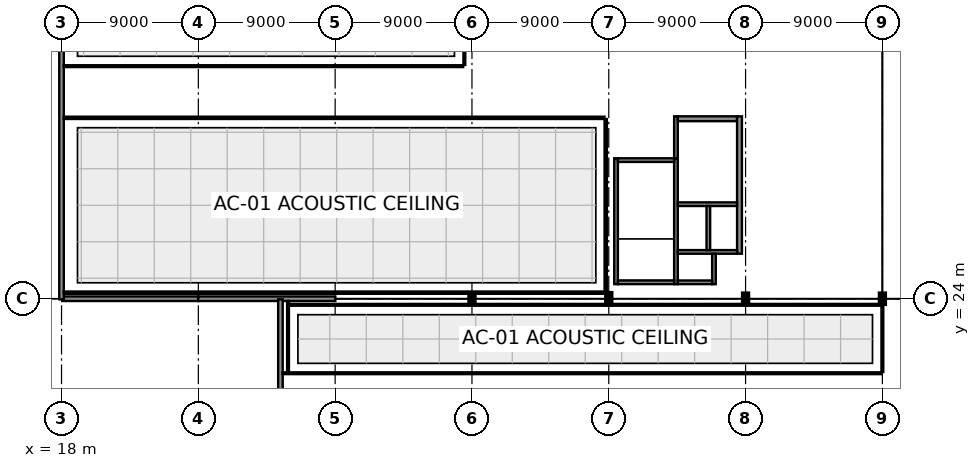
"""IFC4 building model, lengths in metres.
Left out: names, types, materials, properties, quantities, classifications, styles, units other than length and angle.
Written with IfcOpenShell. Run it as: python <this file> out.ifc"""

import sys

from ifc_helpers import new_model, si_unit, direction, frame, frame_2d, origin, origin_2d, place, context, subcontext, project, spatial, rectangle, i_section, extrude, element, fill, save


model = new_model("IFC4")
c1 = context("Model", 3, precision=1e-05, world=origin(), true_north=direction((0.0, 1.0)))
c2 = subcontext(c1, "Body", "Model", "MODEL_VIEW")
j1 = project(units=[si_unit("LENGTHUNIT", "METRE"), si_unit("PLANEANGLEUNIT", "RADIAN")], contexts=[c1])
p1 = place(None, origin())
s1 = spatial("IfcSite", under=j1, at=p1, CompositionType="ELEMENT")
p2 = place(p1, origin())
s2 = spatial("IfcBuilding", under=s1, at=p2, CompositionType="ELEMENT")
p3 = place(p2, frame((0.0, 0.0, 5.4)))
s3 = spatial("IfcBuildingStorey", under=s2, at=p3, CompositionType="ELEMENT", Elevation=5.4)
for number, where, z_axis, x_axis in (
    (1, (45.0, 24.0, 0.0), (0.0, 0.0, 1.0), (1.0, 0.0, 0.0)),
    (2, (54.0, 24.0, 0.0), (0.0, 0.0, 1.0), (0.0, 1.0, 0.0)),
):
    element("IfcColumn", number, at=place(p3, frame(where, z_axis=z_axis, x_axis=x_axis)), inside=s3, PredefinedType="COLUMN", context=c2, shape_type="SweptSolid", body=[
        extrude(i_section(OverallWidth=0.304, OverallDepth=0.716, WebThickness=0.021, FlangeThickness=0.04, at=origin_2d()), origin(), (0.0, 0.0, 1.0), 4.5),
    ])
for number, where, z_axis, x_axis in (
    (3, (63.0, 24.0, 0.0), (0.0, 0.0, 1.0), (1.0, 0.0, 0.0)),
    (4, (72.0, 24.0, 0.0), (0.0, 0.0, 1.0), (1.0, 0.0, 0.0)),
):
    element("IfcColumn", number, at=place(p3, frame(where, z_axis=z_axis, x_axis=x_axis)), inside=s3, PredefinedType="COLUMN", context=c2, shape_type="SweptSolid", body=[
        extrude(i_section(OverallWidth=0.3, OverallDepth=0.65, WebThickness=0.016, FlangeThickness=0.031, at=origin_2d()), origin(), (0.0, 0.0, 1.0), 4.5),
    ])
p4 = place(p3, frame((18.04, 24.0, 0.0), z_axis=(0.0, 0.0, 1.0), x_axis=(1.0, 0.0, 0.0)))
e5 = element("IfcWall", 5, at=p4, inside=s3, PredefinedType="SOLIDWALL", context=c2, shape_type="SweptSolid", body=[
    extrude(rectangle(XDim=8.97, YDim=0.3, at=frame_2d((4.485, 0.0))), origin(), (0.0, 0.0, 1.0), 4.18),
])
p5 = place(p4, frame((1.512, 0.0, 0.85)))
e6 = element("IfcOpeningElement", 6, at=p5, cuts=e5, PredefinedType="OPENING", context=c2, shape_type="SweptSolid", body=[
    extrude(rectangle(XDim=2.0, YDim=2.0, at=frame_2d((1.0, 1.0))), frame((0.0, 0.165, 0.0), z_axis=(0.0, -1.0, 0.0), x_axis=(1.0, 0.0, 0.0)), (0.0, 0.0, 1.0), 0.33),
])
p6 = place(p4, frame((5.458, 0.0, 0.85)))
e7 = element("IfcOpeningElement", 7, at=p6, cuts=e5, PredefinedType="OPENING", context=c2, shape_type="SweptSolid", body=[
    extrude(rectangle(XDim=2.0, YDim=2.0, at=frame_2d((1.0, 1.0))), frame((0.0, 0.165, 0.0), z_axis=(0.0, -1.0, 0.0), x_axis=(1.0, 0.0, 0.0)), (0.0, 0.0, 1.0), 0.33),
])
p7 = place(p3, frame((26.99, 24.0, 0.0), z_axis=(0.0, 0.0, 1.0), x_axis=(1.0, 0.0, 0.0)))
e8 = element("IfcWall", 8, at=p7, inside=s3, PredefinedType="SOLIDWALL", context=c2, shape_type="SweptSolid", body=[
    extrude(rectangle(XDim=9.02, YDim=0.3, at=frame_2d((4.51, 0.0))), origin(), (0.0, 0.0, 1.0), 3.147),
])
p8 = place(p3, frame((18.0, 41.727, 0.0), z_axis=(0.0, 0.0, 1.0), x_axis=(0.0, -1.0, 0.0)))
e9 = element("IfcWall", 9, at=p8, inside=s3, PredefinedType="SOLIDWALL", context=c2, shape_type="SweptSolid", body=[
    extrude(rectangle(XDim=17.767, YDim=0.3, at=frame_2d((8.884, 0.0))), origin(), (0.0, 0.0, 1.0), 4.18),
])
p9 = place(p8, frame((9.677, 0.0, 0.0)))
e10 = element("IfcOpeningElement", 10, at=p9, cuts=e9, PredefinedType="OPENING", context=c2, shape_type="SweptSolid", body=[
    extrude(rectangle(XDim=1.1, YDim=2.2, at=frame_2d((0.55, 1.1))), frame((0.0, 0.165, 0.0), z_axis=(0.0, -1.0, 0.0), x_axis=(1.0, 0.0, 0.0)), (0.0, 0.0, 1.0), 0.33),
])
p10 = place(p3, frame((32.4, 23.96, 0.0), z_axis=(0.0, 0.0, 1.0), x_axis=(0.0, -1.0, 0.0)))
e11 = element("IfcWall", 11, at=p10, inside=s3, PredefinedType="SOLIDWALL", context=c2, shape_type="SweptSolid", body=[
    extrude(rectangle(XDim=11.97, YDim=0.3, at=frame_2d((5.985, 0.0))), origin(), (0.0, 0.0, 1.0), 3.455),
])
p11 = place(p10, frame((2.941, 0.0, 0.9)))
e12 = element("IfcOpeningElement", 12, at=p11, cuts=e11, PredefinedType="OPENING", context=c2, shape_type="SweptSolid", body=[
    extrude(rectangle(XDim=1.3, YDim=1.3, at=frame_2d((0.65, 0.65))), frame((0.0, 0.165, 0.0), z_axis=(0.0, -1.0, 0.0), x_axis=(1.0, 0.0, 0.0)), (0.0, 0.0, 1.0), 0.33),
])
p12 = place(p10, frame((8.5, 0.0, 0.9)))
e13 = element("IfcOpeningElement", 13, at=p12, cuts=e11, PredefinedType="OPENING", context=c2, shape_type="SweptSolid", body=[
    extrude(rectangle(XDim=1.3, YDim=1.3, at=frame_2d((0.65, 0.65))), frame((0.0, 0.165, 0.0), z_axis=(0.0, -1.0, 0.0), x_axis=(1.0, 0.0, 0.0)), (0.0, 0.0, 1.0), 0.33),
])
p13 = place(p3, frame((54.48, 24.96, 0.0), z_axis=(0.0, 0.0, 1.0), x_axis=(0.0, 1.0, 0.0)))
e14 = element("IfcWall", 14, at=p13, inside=s3, PredefinedType="SHEAR", context=c2, shape_type="SweptSolid", body=[
    extrude(rectangle(XDim=8.28, YDim=0.24, at=frame_2d((4.14, 0.0))), origin(), (0.0, 0.0, 1.0), 4.31),
])
p14 = place(p3, frame((58.42, 24.96, 0.0), z_axis=(0.0, 0.0, 1.0), x_axis=(0.0, 1.0, 0.0)))
e15 = element("IfcWall", 15, at=p14, inside=s3, PredefinedType="SHEAR", context=c2, shape_type="SweptSolid", body=[
    extrude(rectangle(XDim=8.28, YDim=0.24, at=frame_2d((4.14, 0.0))), origin(), (0.0, 0.0, 1.0), 4.31),
])
p15 = place(p14, frame((6.49, 0.0, 0.0)))
e16 = element("IfcOpeningElement", 16, at=p15, cuts=e15, PredefinedType="OPENING", context=c2, shape_type="SweptSolid", body=[
    extrude(rectangle(XDim=1.3, YDim=2.2, at=frame_2d((0.65, 1.1))), frame((0.0, 0.135, 0.0), z_axis=(0.0, -1.0, 0.0), x_axis=(1.0, 0.0, 0.0)), (0.0, 0.0, 1.0), 0.27),
])
for number, where, z_axis, x_axis in (
    (17, (54.6, 25.08, 0.0), (0.0, 0.0, 1.0), (1.0, 0.0, 0.0)),
    (18, (54.6, 33.12, 0.0), (0.0, 0.0, 1.0), (1.0, 0.0, 0.0)),
):
    element("IfcWall", number, at=place(p3, frame(where, z_axis=z_axis, x_axis=x_axis)), inside=s3, PredefinedType="SHEAR", context=c2, shape_type="SweptSolid", body=[
        extrude(rectangle(XDim=3.7, YDim=0.24, at=frame_2d((1.85, 0.0))), origin(), (0.0, 0.0, 1.0), 4.31),
    ])
p16 = place(p3, frame((58.42, 33.24, 0.0), z_axis=(0.0, 0.0, 1.0), x_axis=(0.0, 1.0, 0.0)))
e19 = element("IfcWall", 19, at=p16, inside=s3, PredefinedType="SHEAR", context=c2, shape_type="SweptSolid", body=[
    extrude(rectangle(XDim=2.76, YDim=0.24, at=frame_2d((1.38, 0.0))), origin(), (0.0, 0.0, 1.0), 4.16),
])
p17 = place(p3, frame((58.54, 35.84, 0.0), z_axis=(0.0, 0.0, 1.0), x_axis=(1.0, 0.0, 0.0)))
e20 = element("IfcWall", 20, at=p17, inside=s3, PredefinedType="SHEAR", context=c2, shape_type="SweptSolid", body=[
    extrude(rectangle(XDim=3.9, YDim=0.32, at=frame_2d((1.95, 0.0))), origin(), (0.0, 0.0, 1.0), 4.16),
])
p18 = place(p17, frame((1.225, 0.0, 0.0)))
e21 = element("IfcOpeningElement", 21, at=p18, cuts=e20, PredefinedType="OPENING", context=c2, shape_type="SweptSolid", body=[
    extrude(rectangle(XDim=1.45, YDim=2.2, at=frame_2d((0.725, 1.1))), frame((0.0, 0.175, 0.0), z_axis=(0.0, -1.0, 0.0), x_axis=(1.0, 0.0, 0.0)), (0.0, 0.0, 1.0), 0.35),
])
p19 = place(p3, frame((62.6, 26.96, 0.0), z_axis=(0.0, 0.0, 1.0), x_axis=(0.0, 1.0, 0.0)))
e22 = element("IfcWall", 22, at=p19, inside=s3, PredefinedType="SHEAR", context=c2, shape_type="SweptSolid", body=[
    extrude(rectangle(XDim=9.04, YDim=0.32, at=frame_2d((4.52, 0.0))), origin(), (0.0, 0.0, 1.0), 4.16),
])
p20 = place(p3, frame((58.54, 30.22, 0.0), z_axis=(0.0, 0.0, 1.0), x_axis=(1.0, 0.0, 0.0)))
e23 = element("IfcWall", 23, at=p20, inside=s3, PredefinedType="SHEAR", context=c2, shape_type="SweptSolid", body=[
    extrude(rectangle(XDim=3.9, YDim=0.24, at=frame_2d((1.95, 0.0))), origin(), (0.0, 0.0, 1.0), 4.31),
])
p21 = place(p20, frame((0.385, 0.0, 0.0)))
e24 = element("IfcOpeningElement", 24, at=p21, cuts=e23, PredefinedType="OPENING", context=c2, shape_type="SweptSolid", body=[
    extrude(rectangle(XDim=1.3, YDim=2.2, at=frame_2d((0.65, 1.1))), frame((0.0, 0.135, 0.0), z_axis=(0.0, -1.0, 0.0), x_axis=(1.0, 0.0, 0.0)), (0.0, 0.0, 1.0), 0.27),
])
p22 = place(p20, frame((2.335, 0.0, 0.0)))
e25 = element("IfcOpeningElement", 25, at=p22, cuts=e23, PredefinedType="OPENING", context=c2, shape_type="SweptSolid", body=[
    extrude(rectangle(XDim=1.3, YDim=2.2, at=frame_2d((0.65, 1.1))), frame((0.0, 0.135, 0.0), z_axis=(0.0, -1.0, 0.0), x_axis=(1.0, 0.0, 0.0)), (0.0, 0.0, 1.0), 0.27),
])
p23 = place(p3, frame((58.54, 27.08, 0.0), z_axis=(0.0, 0.0, 1.0), x_axis=(1.0, 0.0, 0.0)))
e26 = element("IfcWall", 26, at=p23, inside=s3, PredefinedType="SHEAR", context=c2, shape_type="SweptSolid", body=[
    extrude(rectangle(XDim=3.9, YDim=0.24, at=frame_2d((1.95, 0.0))), origin(), (0.0, 0.0, 1.0), 4.31),
])
p24 = place(p3, frame((60.55, 27.2, 0.0), z_axis=(0.0, 0.0, 1.0), x_axis=(0.0, 1.0, 0.0)))
e27 = element("IfcWall", 27, at=p24, inside=s3, PredefinedType="SHEAR", context=c2, shape_type="SweptSolid", body=[
    extrude(rectangle(XDim=2.9, YDim=0.24, at=frame_2d((1.45, 0.0))), origin(), (0.0, 0.0, 1.0), 4.31),
])
p25 = place(p3, frame((60.92, 24.96, 0.0), z_axis=(0.0, 0.0, 1.0), x_axis=(0.0, 1.0, 0.0)))
e28 = element("IfcWall", 28, at=p25, inside=s3, PredefinedType="SHEAR", context=c2, shape_type="SweptSolid", body=[
    extrude(rectangle(XDim=2.0, YDim=0.24, at=frame_2d((1.0, 0.0))), origin(), (0.0, 0.0, 1.0), 4.31),
])
p26 = place(p3, frame((58.54, 25.08, 0.0), z_axis=(0.0, 0.0, 1.0), x_axis=(1.0, 0.0, 0.0)))
e29 = element("IfcWall", 29, at=p26, inside=s3, PredefinedType="SHEAR", context=c2, shape_type="SweptSolid", body=[
    extrude(rectangle(XDim=2.26, YDim=0.24, at=frame_2d((1.13, 0.0))), origin(), (0.0, 0.0, 1.0), 4.31),
])
p27 = place(p3, frame((53.72, 24.4, 0.0), z_axis=(0.0, 0.0, 1.0), x_axis=(-1.0, 0.0, 0.0)))
e30 = element("IfcWall", 30, at=p27, inside=s3, PredefinedType="PARTITIONING", context=c2, shape_type="SweptSolid", body=[
    extrude(rectangle(XDim=35.575, YDim=0.15, at=frame_2d((17.788, 0.0))), origin(), (0.0, 0.0, 1.0), 4.14),
])
p28 = place(p3, frame((18.145, 35.9, 0.0), z_axis=(0.0, 0.0, 1.0), x_axis=(1.0, 0.0, 0.0)))
e31 = element("IfcWall", 31, at=p28, inside=s3, PredefinedType="PARTITIONING", context=c2, shape_type="SweptSolid", body=[
    extrude(rectangle(XDim=35.575, YDim=0.15, at=frame_2d((17.788, 0.0))), origin(), (0.0, 0.0, 1.0), 4.14),
])
p29 = place(p28, frame((17.263, 0.0, 0.0)))
e32 = element("IfcOpeningElement", 32, at=p29, cuts=e31, PredefinedType="OPENING", context=c2, shape_type="SweptSolid", body=[
    extrude(rectangle(XDim=1.05, YDim=2.25, at=frame_2d((0.525, 1.125))), frame((0.0, 0.09, 0.0), z_axis=(0.0, -1.0, 0.0), x_axis=(1.0, 0.0, 0.0)), (0.0, 0.0, 1.0), 0.18),
])
p30 = place(p3, frame((53.8, 35.82, 0.0), z_axis=(0.0, 0.0, 1.0), x_axis=(0.0, -1.0, 0.0)))
e33 = element("IfcWall", 33, at=p30, inside=s3, PredefinedType="PARTITIONING", context=c2, shape_type="SweptSolid", body=[
    extrude(rectangle(XDim=11.34, YDim=0.15, at=frame_2d((5.67, 0.0))), origin(), (0.0, 0.0, 1.0), 3.365),
])
p31 = place(p3, frame((44.5, 53.445, 0.0), z_axis=(0.0, 0.0, 1.0), x_axis=(0.0, -1.0, 0.0)))
e34 = element("IfcWall", 34, at=p31, inside=s3, PredefinedType="PARTITIONING", context=c2, shape_type="SweptSolid", body=[
    extrude(rectangle(XDim=14.065, YDim=0.12, at=frame_2d((7.033, 0.0))), origin(), (0.0, 0.0, 1.0), 4.14),
])
p32 = place(p3, frame((44.42, 39.3, 0.0), z_axis=(0.0, 0.0, 1.0), x_axis=(-1.0, 0.0, 0.0)))
e35 = element("IfcWall", 35, at=p32, inside=s3, PredefinedType="PARTITIONING", context=c2, shape_type="SweptSolid", body=[
    extrude(rectangle(XDim=26.275, YDim=0.12, at=frame_2d((13.137, 0.0))), origin(), (0.0, 0.0, 1.0), 4.14),
])
p33 = place(p32, frame((12.663, 0.0, 0.0)))
e36 = element("IfcOpeningElement", 36, at=p33, cuts=e35, PredefinedType="OPENING", context=c2, shape_type="SweptSolid", body=[
    extrude(rectangle(XDim=0.95, YDim=2.15, at=frame_2d((0.475, 1.075))), frame((0.0, 0.075, 0.0), z_axis=(0.0, -1.0, 0.0), x_axis=(1.0, 0.0, 0.0)), (0.0, 0.0, 1.0), 0.15),
])
p34 = place(p3, frame((32.9, 19.18, 0.0), z_axis=(0.0, 0.0, 1.0), x_axis=(0.0, 1.0, 0.0)))
e37 = element("IfcWall", 37, at=p34, inside=s3, PredefinedType="PARTITIONING", context=c2, shape_type="SweptSolid", body=[
    extrude(rectangle(XDim=4.675, YDim=0.12, at=frame_2d((2.337, 0.0))), origin(), (0.0, 0.0, 1.0), 4.14),
])
p35 = place(p3, frame((32.955, 23.6, 0.0), z_axis=(0.0, 0.0, 1.0), x_axis=(1.0, 0.0, 0.0)))
e38 = element("IfcWall", 38, at=p35, inside=s3, PredefinedType="PARTITIONING", context=c2, shape_type="SweptSolid", body=[
    extrude(rectangle(XDim=38.965, YDim=0.12, at=frame_2d((19.482, 0.0))), origin(), (0.0, 0.0, 1.0), 4.14),
])
p36 = place(p3, frame((72.0, 23.52, 0.0), z_axis=(0.0, 0.0, 1.0), x_axis=(0.0, -1.0, 0.0)))
e39 = element("IfcWall", 39, at=p36, inside=s3, PredefinedType="PARTITIONING", context=c2, shape_type="SweptSolid", body=[
    extrude(rectangle(XDim=4.34, YDim=0.12, at=frame_2d((2.17, 0.0))), origin(), (0.0, 0.0, 1.0), 3.625),
])
p37 = place(p3, frame((71.92, 19.1, 0.0), z_axis=(0.0, 0.0, 1.0), x_axis=(-1.0, 0.0, 0.0)))
e40 = element("IfcWall", 40, at=p37, inside=s3, PredefinedType="PARTITIONING", context=c2, shape_type="SweptSolid", body=[
    extrude(rectangle(XDim=39.375, YDim=0.12, at=frame_2d((19.688, 0.0))), origin(), (0.0, 0.0, 1.0), 4.14),
])
p38 = place(p37, frame((19.212, 0.0, 0.0)))
e41 = element("IfcOpeningElement", 41, at=p38, cuts=e40, PredefinedType="OPENING", context=c2, shape_type="SweptSolid", body=[
    extrude(rectangle(XDim=0.95, YDim=2.15, at=frame_2d((0.475, 1.075))), frame((0.0, 0.075, 0.0), z_axis=(0.0, -1.0, 0.0), x_axis=(1.0, 0.0, 0.0)), (0.0, 0.0, 1.0), 0.15),
])
p39 = place(p9, frame((1.1, 0.0, 0.0), z_axis=(0.0, 0.0, 1.0), x_axis=(-1.0, 0.0, 0.0)))
e42 = element("IfcDoor", 42, at=p39, inside=s3, OperationType="SINGLE_SWING_LEFT", PredefinedType="DOOR", context=c2, shape_type="SweptSolid", body=[
    extrude(rectangle(XDim=1.1, YDim=2.2, at=frame_2d((0.55, 1.1))), frame((0.0, 0.025, 0.0), z_axis=(0.0, -1.0, 0.0), x_axis=(1.0, 0.0, 0.0)), (0.0, 0.0, 1.0), 0.05),
])
fill(e10, e42)
p40 = place(p5, origin())
e43 = element("IfcWindow", 43, at=p40, inside=s3, PartitioningType="SINGLE_PANEL", PredefinedType="WINDOW", context=c2, shape_type="SweptSolid", body=[
    extrude(rectangle(XDim=2.0, YDim=2.0, at=frame_2d((1.0, 1.0))), frame((0.0, 0.03, 0.0), z_axis=(0.0, -1.0, 0.0), x_axis=(1.0, 0.0, 0.0)), (0.0, 0.0, 1.0), 0.06),
])
fill(e6, e43)
p41 = place(p6, origin())
e44 = element("IfcWindow", 44, at=p41, inside=s3, PartitioningType="SINGLE_PANEL", PredefinedType="WINDOW", context=c2, shape_type="SweptSolid", body=[
    extrude(rectangle(XDim=2.0, YDim=2.0, at=frame_2d((1.0, 1.0))), frame((0.0, 0.03, 0.0), z_axis=(0.0, -1.0, 0.0), x_axis=(1.0, 0.0, 0.0)), (0.0, 0.0, 1.0), 0.06),
])
fill(e7, e44)
p42 = place(p11, origin())
e45 = element("IfcWindow", 45, at=p42, inside=s3, PartitioningType="SINGLE_PANEL", PredefinedType="WINDOW", context=c2, shape_type="SweptSolid", body=[
    extrude(rectangle(XDim=1.3, YDim=1.3, at=frame_2d((0.65, 0.65))), frame((0.0, 0.03, 0.0), z_axis=(0.0, -1.0, 0.0), x_axis=(1.0, 0.0, 0.0)), (0.0, 0.0, 1.0), 0.06),
])
fill(e12, e45)
p43 = place(p15, frame((1.3, 0.0, 0.0), z_axis=(0.0, 0.0, 1.0), x_axis=(-1.0, 0.0, 0.0)))
e46 = element("IfcDoor", 46, at=p43, inside=s3, OperationType="SINGLE_SWING_LEFT", PredefinedType="DOOR", context=c2, shape_type="SweptSolid", body=[
    extrude(rectangle(XDim=1.3, YDim=2.2, at=frame_2d((0.65, 1.1))), frame((0.0, 0.025, 0.0), z_axis=(0.0, -1.0, 0.0), x_axis=(1.0, 0.0, 0.0)), (0.0, 0.0, 1.0), 0.05),
])
fill(e16, e46)
p44 = place(p18, origin())
e47 = element("IfcDoor", 47, at=p44, inside=s3, OperationType="DOUBLE_DOOR_SINGLE_SWING", PredefinedType="DOOR", context=c2, shape_type="SweptSolid", body=[
    extrude(rectangle(XDim=1.45, YDim=2.2, at=frame_2d((0.725, 1.1))), frame((0.0, 0.025, 0.0), z_axis=(0.0, -1.0, 0.0), x_axis=(1.0, 0.0, 0.0)), (0.0, 0.0, 1.0), 0.05),
])
fill(e21, e47)
p45 = place(p21, origin())
e48 = element("IfcDoor", 48, at=p45, inside=s3, OperationType="DOUBLE_DOOR_SLIDING", PredefinedType="DOOR", context=c2, shape_type="SweptSolid", body=[
    extrude(rectangle(XDim=1.3, YDim=2.2, at=frame_2d((0.65, 1.1))), frame((0.0, 0.025, 0.0), z_axis=(0.0, -1.0, 0.0), x_axis=(1.0, 0.0, 0.0)), (0.0, 0.0, 1.0), 0.05),
])
fill(e24, e48)
p46 = place(p22, origin())
e49 = element("IfcDoor", 49, at=p46, inside=s3, OperationType="DOUBLE_DOOR_SLIDING", PredefinedType="DOOR", context=c2, shape_type="SweptSolid", body=[
    extrude(rectangle(XDim=1.3, YDim=2.2, at=frame_2d((0.65, 1.1))), frame((0.0, 0.025, 0.0), z_axis=(0.0, -1.0, 0.0), x_axis=(1.0, 0.0, 0.0)), (0.0, 0.0, 1.0), 0.05),
])
fill(e25, e49)
p47 = place(p29, origin())
e50 = element("IfcDoor", 50, at=p47, inside=s3, OperationType="SINGLE_SWING_LEFT", PredefinedType="DOOR", context=c2, shape_type="SweptSolid", body=[
    extrude(rectangle(XDim=1.05, YDim=2.25, at=frame_2d((0.525, 1.125))), frame((0.0, 0.025, 0.0), z_axis=(0.0, -1.0, 0.0), x_axis=(1.0, 0.0, 0.0)), (0.0, 0.0, 1.0), 0.05),
])
fill(e32, e50)
p48 = place(p33, frame((0.95, 0.0, 0.0), z_axis=(0.0, 0.0, 1.0), x_axis=(-1.0, 0.0, 0.0)))
e51 = element("IfcDoor", 51, at=p48, inside=s3, OperationType="SINGLE_SWING_RIGHT", PredefinedType="DOOR", context=c2, shape_type="SweptSolid", body=[
    extrude(rectangle(XDim=0.95, YDim=2.15, at=frame_2d((0.475, 1.075))), frame((0.0, 0.025, 0.0), z_axis=(0.0, -1.0, 0.0), x_axis=(1.0, 0.0, 0.0)), (0.0, 0.0, 1.0), 0.05),
])
fill(e36, e51)
p49 = place(p38, origin())
e52 = element("IfcDoor", 52, at=p49, inside=s3, OperationType="SINGLE_SWING_LEFT", PredefinedType="DOOR", context=c2, shape_type="SweptSolid", body=[
    extrude(rectangle(XDim=0.95, YDim=2.15, at=frame_2d((0.475, 1.075))), frame((0.0, 0.025, 0.0), z_axis=(0.0, -1.0, 0.0), x_axis=(1.0, 0.0, 0.0)), (0.0, 0.0, 1.0), 0.05),
])
fill(e41, e52)
save(model, sys.argv[1])
